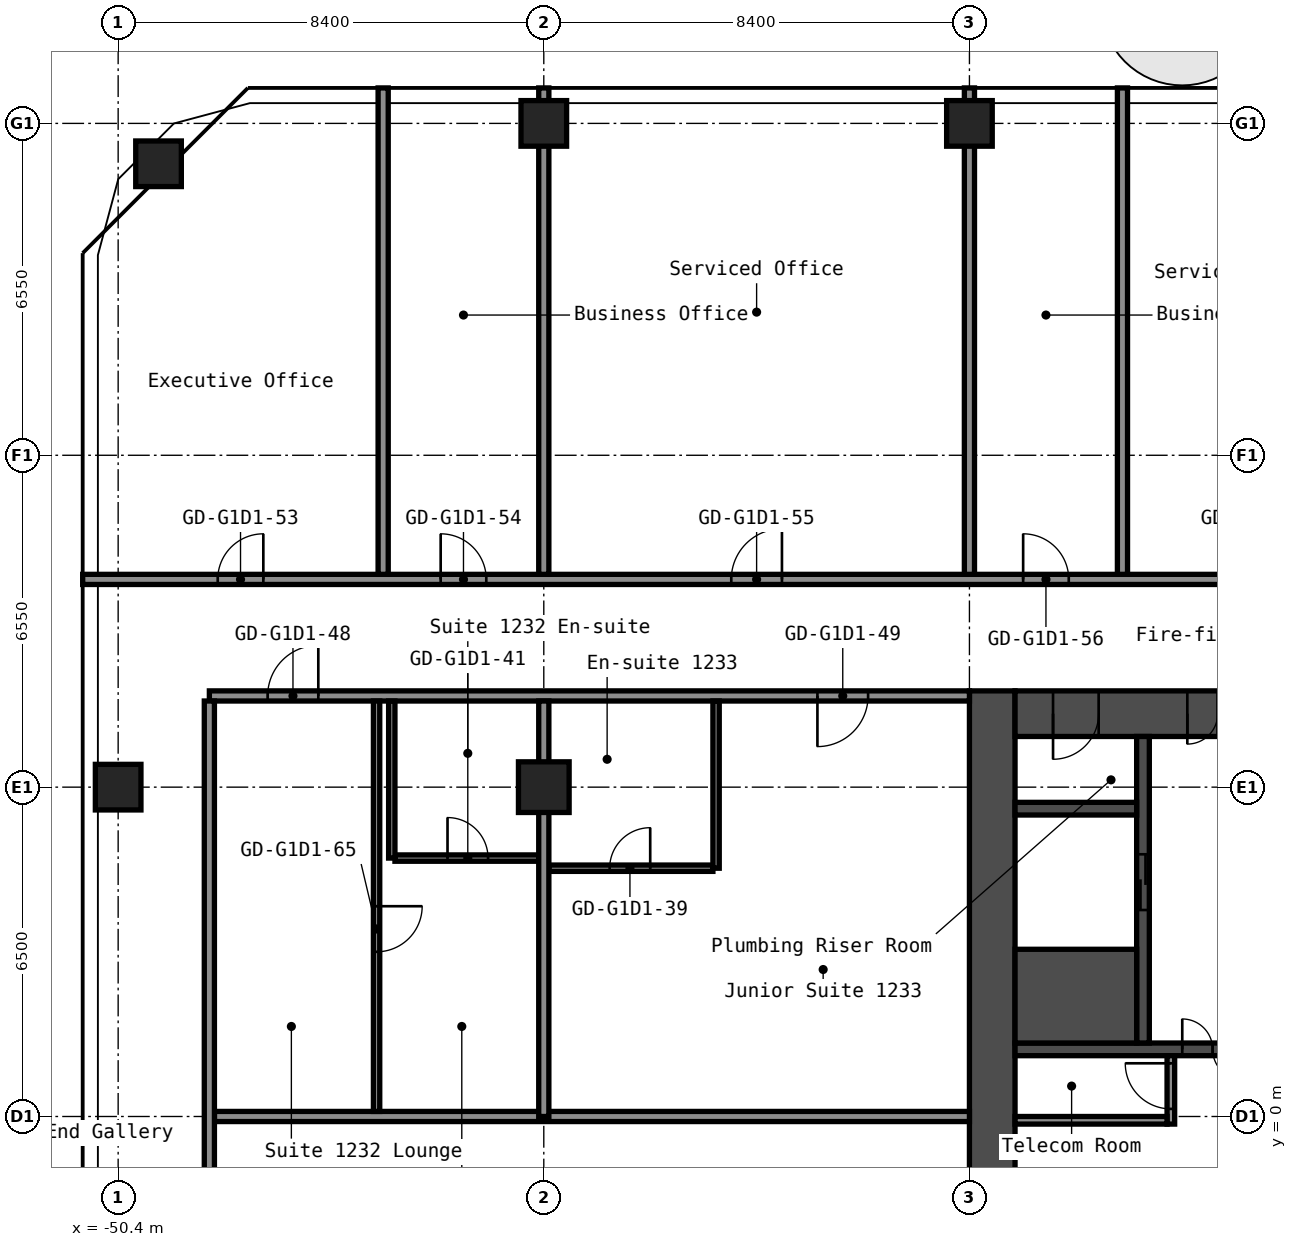
"""IFC4 building model, lengths in metres.
Left out: names, types, materials, properties, quantities, classifications, styles, units other than length and angle.
Written with IfcOpenShell. Run it as: python <this file> out.ifc"""

import sys

from ifc_helpers import new_model, si_unit, direction, frame, frame_2d, origin, origin_2d, place, context, subcontext, project, spatial, rectangle, hollow_rectangle, extrude, element, fill, save


model = new_model("IFC4")
c1 = context("Model", 3, precision=1e-05, world=origin(), true_north=direction((0.0, 1.0)))
c2 = subcontext(c1, "Body", "Model", "MODEL_VIEW")
j1 = project(units=[si_unit("LENGTHUNIT", "METRE"), si_unit("PLANEANGLEUNIT", "RADIAN")], contexts=[c1])
p1 = place(None, origin())
s1 = spatial("IfcSite", under=j1, at=p1, CompositionType="ELEMENT")
p2 = place(p1, origin())
s2 = spatial("IfcBuilding", under=s1, at=p2, CompositionType="ELEMENT")
p3 = place(p2, frame((0.0, 0.0, 45.4)))
s3 = spatial("IfcBuildingStorey", under=s2, at=p3, CompositionType="ELEMENT", Elevation=45.4)
for number, where, z_axis, x_axis in (
    (1, (-50.4, 6.5, 0.0), (0.0, 0.0, 1.0), (1.0, 0.0, 0.0)),
    (2, (-49.603, 18.803, 0.0), (0.0, 0.0, 1.0), (1.0, 0.0, 0.0)),
):
    element("IfcColumn", number, at=place(p3, frame(where, z_axis=z_axis, x_axis=x_axis)), inside=s3, PredefinedType="COLUMN", context=c2, shape_type="SweptSolid", body=[
        extrude(hollow_rectangle(XDim=0.9, YDim=0.9, WallThickness=0.036, at=origin_2d()), origin(), (0.0, 0.0, 1.0), 2.8),
    ])
p4 = place(p3, frame((-42.0, 6.5, 0.0), z_axis=(0.0, 0.0, 1.0), x_axis=(1.0, 0.0, 0.0)))
e3 = element("IfcColumn", 3, at=p4, inside=s3, PredefinedType="COLUMN", context=c2, shape_type="SweptSolid", body=[
    extrude(hollow_rectangle(XDim=1.0, YDim=1.0, WallThickness=0.04, at=origin_2d()), origin(), (0.0, 0.0, 1.0), 2.8),
])
for number, where, z_axis, x_axis in (
    (4, (-42.0, 19.6, 0.0), (0.0, 0.0, 1.0), (1.0, 0.0, 0.0)),
    (5, (-33.6, 19.6, 0.0), (0.0, 0.0, 1.0), (1.0, 0.0, 0.0)),
):
    element("IfcColumn", number, at=place(p3, frame(where, z_axis=z_axis, x_axis=x_axis)), inside=s3, PredefinedType="COLUMN", context=c2, shape_type="SweptSolid", body=[
        extrude(hollow_rectangle(XDim=0.9, YDim=0.9, WallThickness=0.036, at=origin_2d()), origin(), (0.0, 0.0, 1.0), 2.8),
    ])
p5 = place(p3, frame((-33.15, -8.4, 0.0), z_axis=(0.0, 0.0, 1.0), x_axis=(0.0, 1.0, 0.0)))
e6 = element("IfcWall", 6, at=p5, inside=s3, PredefinedType="SHEAR", context=c2, shape_type="SweptSolid", body=[
    extrude(rectangle(XDim=16.8, YDim=0.9, at=frame_2d((8.4, 0.0))), origin(), (0.0, 0.0, 1.0), 2.8),
])
p6 = place(p3, frame((-32.7, 7.95, 0.0), z_axis=(0.0, 0.0, 1.0), x_axis=(1.0, 0.0, 0.0)))
e7 = element("IfcWall", 7, at=p6, inside=s3, PredefinedType="SHEAR", context=c2, shape_type="SweptSolid", body=[
    extrude(rectangle(XDim=15.0, YDim=0.9, at=frame_2d((7.5, 0.0))), origin(), (0.0, 0.0, 1.0), 2.8),
])
p7 = place(p6, frame((3.4, 0.0, 0.0)))
e8 = element("IfcOpeningElement", 8, at=p7, cuts=e7, PredefinedType="OPENING", context=c2, shape_type="SweptSolid", body=[
    extrude(rectangle(XDim=1.2, YDim=2.1, at=frame_2d((0.6, 1.05))), frame((0.0, 0.46, 0.0), z_axis=(0.0, -1.0, 0.0), x_axis=(1.0, 0.0, 0.0)), (0.0, 0.0, 1.0), 0.92),
])
p8 = place(p6, frame((0.75, 0.0, 0.0)))
e9 = element("IfcOpeningElement", 9, at=p8, cuts=e7, PredefinedType="OPENING", context=c2, shape_type="SweptSolid", body=[
    extrude(rectangle(XDim=0.9, YDim=2.1, at=frame_2d((0.45, 1.05))), frame((0.0, 0.46, 0.0), z_axis=(0.0, -1.0, 0.0), x_axis=(1.0, 0.0, 0.0)), (0.0, 0.0, 1.0), 0.92),
])
p9 = place(p3, frame((-32.7, 1.325, 0.0), z_axis=(0.0, 0.0, 1.0), x_axis=(1.0, 0.0, 0.0)))
e10 = element("IfcWall", 10, at=p9, inside=s3, PredefinedType="SHEAR", context=c2, shape_type="SweptSolid", body=[
    extrude(rectangle(XDim=5.05, YDim=0.25, at=frame_2d((2.525, 0.0))), origin(), (0.0, 0.0, 1.0), 2.8),
])
p10 = place(p9, frame((3.3, 0.0, 0.0)))
e11 = element("IfcOpeningElement", 11, at=p10, cuts=e10, PredefinedType="OPENING", context=c2, shape_type="SweptSolid", body=[
    extrude(rectangle(XDim=1.2, YDim=2.1, at=frame_2d((0.6, 1.05))), frame((0.0, 0.135, 0.0), z_axis=(0.0, -1.0, 0.0), x_axis=(1.0, 0.0, 0.0)), (0.0, 0.0, 1.0), 0.27),
])
p11 = place(p3, frame((-30.175, 1.45, 0.0), z_axis=(0.0, 0.0, 1.0), x_axis=(0.0, 1.0, 0.0)))
e12 = element("IfcWall", 12, at=p11, inside=s3, PredefinedType="SHEAR", context=c2, shape_type="SweptSolid", body=[
    extrude(rectangle(XDim=6.05, YDim=0.25, at=frame_2d((3.025, 0.0))), origin(), (0.0, 0.0, 1.0), 2.8),
])
p12 = place(p11, frame((2.625, 0.0, 0.0)))
e13 = element("IfcOpeningElement", 13, at=p12, cuts=e12, PredefinedType="OPENING", context=c2, shape_type="SweptSolid", body=[
    extrude(rectangle(XDim=1.1, YDim=2.1, at=frame_2d((0.55, 1.05))), frame((0.0, 0.135, 0.0), z_axis=(0.0, -1.0, 0.0), x_axis=(1.0, 0.0, 0.0)), (0.0, 0.0, 1.0), 0.27),
])
p13 = place(p3, frame((-32.7, 2.375, 0.0), z_axis=(0.0, 0.0, 1.0), x_axis=(1.0, 0.0, 0.0)))
e14 = element("IfcWall", 14, at=p13, inside=s3, PredefinedType="SHEAR", context=c2, shape_type="SweptSolid", body=[
    extrude(rectangle(XDim=2.4, YDim=1.85, at=frame_2d((1.2, 0.0))), origin(), (0.0, 0.0, 1.0), 2.8),
])
p14 = place(p3, frame((-32.7, 6.075, 0.0), z_axis=(0.0, 0.0, 1.0), x_axis=(1.0, 0.0, 0.0)))
e15 = element("IfcWall", 15, at=p14, inside=s3, PredefinedType="SHEAR", context=c2, shape_type="SweptSolid", body=[
    extrude(rectangle(XDim=2.4, YDim=0.25, at=frame_2d((1.2, 0.0))), origin(), (0.0, 0.0, 1.0), 2.8),
])
p15 = place(p3, frame((-29.625, -0.15, 0.0), z_axis=(0.0, 0.0, 1.0), x_axis=(0.0, 1.0, 0.0)))
e16 = element("IfcWall", 16, at=p15, inside=s3, PredefinedType="PARTITIONING", context=c2, shape_type="SweptSolid", body=[
    extrude(rectangle(XDim=1.35, YDim=0.15, at=frame_2d((0.675, 0.0))), origin(), (0.0, 0.0, 1.0), 2.8),
])
p16 = place(p15, frame((0.3, 0.0, 0.0)))
e17 = element("IfcOpeningElement", 17, at=p16, cuts=e16, PredefinedType="OPENING", context=c2, shape_type="SweptSolid", body=[
    extrude(rectangle(XDim=0.9, YDim=2.1, at=frame_2d((0.45, 1.05))), frame((0.0, 0.085, 0.0), z_axis=(0.0, -1.0, 0.0), x_axis=(1.0, 0.0, 0.0)), (0.0, 0.0, 1.0), 0.17),
])
p17 = place(p3, frame((-32.7, -0.075, 0.0), z_axis=(0.0, 0.0, 1.0), x_axis=(1.0, 0.0, 0.0)))
e18 = element("IfcWall", 18, at=p17, inside=s3, PredefinedType="PARTITIONING", context=c2, shape_type="SweptSolid", body=[
    extrude(rectangle(XDim=3.0, YDim=0.15, at=frame_2d((1.5, 0.0))), origin(), (0.0, 0.0, 1.0), 2.8),
])
p18 = place(p3, frame((-48.5, 0.0, 0.0), z_axis=(0.0, 0.0, 1.0), x_axis=(1.0, 0.0, 0.0)))
e19 = element("IfcWall", 19, at=p18, inside=s3, PredefinedType="PARTITIONING", context=c2, shape_type="SweptSolid", body=[
    extrude(rectangle(XDim=14.9, YDim=0.2, at=frame_2d((7.45, 0.0))), origin(), (0.0, 0.0, 1.0), 2.8),
])
p19 = place(p3, frame((-41.9, 4.9, 0.0), z_axis=(0.0, 0.0, 1.0), x_axis=(1.0, 0.0, 0.0)))
e20 = element("IfcWall", 20, at=p19, inside=s3, PredefinedType="PARTITIONING", context=c2, shape_type="SweptSolid", body=[
    extrude(rectangle(XDim=3.237, YDim=0.125, at=frame_2d((1.619, 0.0))), origin(), (0.0, 0.0, 1.0), 2.8),
])
p20 = place(p19, frame((1.2, 0.0, 0.0)))
e21 = element("IfcOpeningElement", 21, at=p20, cuts=e20, PredefinedType="OPENING", context=c2, shape_type="SweptSolid", body=[
    extrude(rectangle(XDim=0.8, YDim=2.1, at=frame_2d((0.4, 1.05))), frame((0.0, 0.073, 0.0), z_axis=(0.0, -1.0, 0.0), x_axis=(1.0, 0.0, 0.0)), (0.0, 0.0, 1.0), 0.145),
])
p21 = place(p3, frame((-44.938, 5.1, 0.0), z_axis=(0.0, 0.0, 1.0), x_axis=(1.0, 0.0, 0.0)))
e22 = element("IfcWall", 22, at=p21, inside=s3, PredefinedType="PARTITIONING", context=c2, shape_type="SweptSolid", body=[
    extrude(rectangle(XDim=2.837, YDim=0.125, at=frame_2d((1.419, 0.0))), origin(), (0.0, 0.0, 1.0), 2.8),
])
p22 = place(p21, frame((1.038, 0.0, 0.0)))
e23 = element("IfcOpeningElement", 23, at=p22, cuts=e22, PredefinedType="OPENING", context=c2, shape_type="SweptSolid", body=[
    extrude(rectangle(XDim=0.8, YDim=2.1, at=frame_2d((0.4, 1.05))), frame((0.0, 0.073, 0.0), z_axis=(0.0, -1.0, 0.0), x_axis=(1.0, 0.0, 0.0)), (0.0, 0.0, 1.0), 0.145),
])
p23 = place(p3, frame((-48.6, 8.3, 0.0), z_axis=(0.0, 0.0, 1.0), x_axis=(1.0, 0.0, 0.0)))
e24 = element("IfcWall", 24, at=p23, inside=s3, PredefinedType="PARTITIONING", context=c2, shape_type="SweptSolid", body=[
    extrude(rectangle(XDim=15.0, YDim=0.2, at=frame_2d((7.5, 0.0))), origin(), (0.0, 0.0, 1.0), 2.8),
])
p24 = place(p23, frame((1.15, 0.0, 0.0)))
e25 = element("IfcOpeningElement", 25, at=p24, cuts=e24, PredefinedType="OPENING", context=c2, shape_type="SweptSolid", body=[
    extrude(rectangle(XDim=1.0, YDim=2.1, at=frame_2d((0.5, 1.05))), frame((0.0, 0.11, 0.0), z_axis=(0.0, -1.0, 0.0), x_axis=(1.0, 0.0, 0.0)), (0.0, 0.0, 1.0), 0.22),
])
p25 = place(p23, frame((12.0, 0.0, 0.0)))
e26 = element("IfcOpeningElement", 26, at=p25, cuts=e24, PredefinedType="OPENING", context=c2, shape_type="SweptSolid", body=[
    extrude(rectangle(XDim=1.0, YDim=2.1, at=frame_2d((0.5, 1.05))), frame((0.0, 0.11, 0.0), z_axis=(0.0, -1.0, 0.0), x_axis=(1.0, 0.0, 0.0)), (0.0, 0.0, 1.0), 0.22),
])
p26 = place(p3, frame((-51.1, 10.6, 0.0), z_axis=(0.0, 0.0, 1.0), x_axis=(1.0, 0.0, 0.0)))
e27 = element("IfcWall", 27, at=p26, inside=s3, PredefinedType="PARTITIONING", context=c2, shape_type="SweptSolid", body=[
    extrude(rectangle(XDim=34.3, YDim=0.2, at=frame_2d((17.15, 0.0))), origin(), (0.0, 0.0, 1.0), 2.8),
])
p27 = place(p26, frame((2.665, 0.0, 0.0)))
e28 = element("IfcOpeningElement", 28, at=p27, cuts=e27, PredefinedType="OPENING", context=c2, shape_type="SweptSolid", body=[
    extrude(rectangle(XDim=0.9, YDim=2.1, at=frame_2d((0.45, 1.05))), frame((0.0, 0.11, 0.0), z_axis=(0.0, -1.0, 0.0), x_axis=(1.0, 0.0, 0.0)), (0.0, 0.0, 1.0), 0.22),
])
p28 = place(p26, frame((7.065, 0.0, 0.0)))
e29 = element("IfcOpeningElement", 29, at=p28, cuts=e27, PredefinedType="OPENING", context=c2, shape_type="SweptSolid", body=[
    extrude(rectangle(XDim=0.9, YDim=2.1, at=frame_2d((0.45, 1.05))), frame((0.0, 0.11, 0.0), z_axis=(0.0, -1.0, 0.0), x_axis=(1.0, 0.0, 0.0)), (0.0, 0.0, 1.0), 0.22),
])
p29 = place(p26, frame((12.8, 0.0, 0.0)))
e30 = element("IfcOpeningElement", 30, at=p29, cuts=e27, PredefinedType="OPENING", context=c2, shape_type="SweptSolid", body=[
    extrude(rectangle(XDim=1.0, YDim=2.1, at=frame_2d((0.5, 1.05))), frame((0.0, 0.11, 0.0), z_axis=(0.0, -1.0, 0.0), x_axis=(1.0, 0.0, 0.0)), (0.0, 0.0, 1.0), 0.22),
])
p30 = place(p26, frame((18.56, 0.0, 0.0)))
e31 = element("IfcOpeningElement", 31, at=p30, cuts=e27, PredefinedType="OPENING", context=c2, shape_type="SweptSolid", body=[
    extrude(rectangle(XDim=0.9, YDim=2.1, at=frame_2d((0.45, 1.05))), frame((0.0, 0.11, 0.0), z_axis=(0.0, -1.0, 0.0), x_axis=(1.0, 0.0, 0.0)), (0.0, 0.0, 1.0), 0.22),
])
p31 = place(p26, frame((22.76, 0.0, 0.0)))
e32 = element("IfcOpeningElement", 32, at=p31, cuts=e27, PredefinedType="OPENING", context=c2, shape_type="SweptSolid", body=[
    extrude(rectangle(XDim=0.9, YDim=2.1, at=frame_2d((0.45, 1.05))), frame((0.0, 0.11, 0.0), z_axis=(0.0, -1.0, 0.0), x_axis=(1.0, 0.0, 0.0)), (0.0, 0.0, 1.0), 0.22),
])
p32 = place(p26, frame((27.045, 0.0, 0.0)))
e33 = element("IfcOpeningElement", 33, at=p32, cuts=e27, PredefinedType="OPENING", context=c2, shape_type="SweptSolid", body=[
    extrude(rectangle(XDim=0.9, YDim=2.1, at=frame_2d((0.45, 1.05))), frame((0.0, 0.11, 0.0), z_axis=(0.0, -1.0, 0.0), x_axis=(1.0, 0.0, 0.0)), (0.0, 0.0, 1.0), 0.22),
])
p33 = place(p26, frame((31.245, 0.0, 0.0)))
e34 = element("IfcOpeningElement", 34, at=p33, cuts=e27, PredefinedType="OPENING", context=c2, shape_type="SweptSolid", body=[
    extrude(rectangle(XDim=0.9, YDim=2.1, at=frame_2d((0.45, 1.05))), frame((0.0, 0.11, 0.0), z_axis=(0.0, -1.0, 0.0), x_axis=(1.0, 0.0, 0.0)), (0.0, 0.0, 1.0), 0.22),
])
p34 = place(p3, frame((-48.6, -8.2, 0.0), z_axis=(0.0, 0.0, 1.0), x_axis=(0.0, 1.0, 0.0)))
e35 = element("IfcWall", 35, at=p34, inside=s3, PredefinedType="PARTITIONING", context=c2, shape_type="SweptSolid", body=[
    extrude(rectangle(XDim=16.4, YDim=0.2, at=frame_2d((8.2, 0.0))), origin(), (0.0, 0.0, 1.0), 2.8),
])
p35 = place(p3, frame((-45.3, 0.1, 0.0), z_axis=(0.0, 0.0, 1.0), x_axis=(0.0, 1.0, 0.0)))
e36 = element("IfcWall", 36, at=p35, inside=s3, PredefinedType="PARTITIONING", context=c2, shape_type="SweptSolid", body=[
    extrude(rectangle(XDim=8.1, YDim=0.125, at=frame_2d((4.05, 0.0))), origin(), (0.0, 0.0, 1.0), 2.8),
])
p36 = place(p35, frame((3.15, 0.0, 0.0)))
e37 = element("IfcOpeningElement", 37, at=p36, cuts=e36, PredefinedType="OPENING", context=c2, shape_type="SweptSolid", body=[
    extrude(rectangle(XDim=0.9, YDim=2.1, at=frame_2d((0.45, 1.05))), frame((0.0, 0.073, 0.0), z_axis=(0.0, -1.0, 0.0), x_axis=(1.0, 0.0, 0.0)), (0.0, 0.0, 1.0), 0.145),
])
p37 = place(p3, frame((-45.17, 10.7, 0.0), z_axis=(0.0, 0.0, 1.0), x_axis=(0.0, 1.0, 0.0)))
e38 = element("IfcWall", 38, at=p37, inside=s3, PredefinedType="PARTITIONING", context=c2, shape_type="SweptSolid", body=[
    extrude(rectangle(XDim=9.6, YDim=0.2, at=frame_2d((4.8, 0.0))), origin(), (0.0, 0.0, 1.0), 2.8),
])
p38 = place(p3, frame((-45.0, 5.1, 0.0), z_axis=(0.0, 0.0, 1.0), x_axis=(0.0, 1.0, 0.0)))
e39 = element("IfcWall", 39, at=p38, inside=s3, PredefinedType="PARTITIONING", context=c2, shape_type="SweptSolid", body=[
    extrude(rectangle(XDim=3.1, YDim=0.125, at=frame_2d((1.55, 0.0))), origin(), (0.0, 0.0, 1.0), 2.8),
])
p39 = place(p3, frame((-42.0, 0.0, 0.0), z_axis=(0.0, 0.0, 1.0), x_axis=(0.0, 1.0, 0.0)))
e40 = element("IfcWall", 40, at=p39, inside=s3, PredefinedType="PARTITIONING", context=c2, shape_type="SweptSolid", body=[
    extrude(rectangle(XDim=8.2, YDim=0.2, at=frame_2d((4.1, 0.0))), origin(), (0.0, 0.0, 1.0), 2.8),
])
p40 = place(p3, frame((-42.0, 10.7, 0.0), z_axis=(0.0, 0.0, 1.0), x_axis=(0.0, 1.0, 0.0)))
e41 = element("IfcWall", 41, at=p40, inside=s3, PredefinedType="PARTITIONING", context=c2, shape_type="SweptSolid", body=[
    extrude(rectangle(XDim=9.6, YDim=0.2, at=frame_2d((4.8, 0.0))), origin(), (0.0, 0.0, 1.0), 2.8),
])
p41 = place(p3, frame((-38.6, 4.9, 0.0), z_axis=(0.0, 0.0, 1.0), x_axis=(0.0, 1.0, 0.0)))
e42 = element("IfcWall", 42, at=p41, inside=s3, PredefinedType="PARTITIONING", context=c2, shape_type="SweptSolid", body=[
    extrude(rectangle(XDim=3.3, YDim=0.125, at=frame_2d((1.65, 0.0))), origin(), (0.0, 0.0, 1.0), 2.8),
])
for number, where, z_axis, x_axis in (
    (43, (-33.6, 10.7, 0.0), (0.0, 0.0, 1.0), (0.0, 1.0, 0.0)),
    (44, (-30.58, 10.7, 0.0), (0.0, 0.0, 1.0), (0.0, 1.0, 0.0)),
):
    element("IfcWall", number, at=place(p3, frame(where, z_axis=z_axis, x_axis=x_axis)), inside=s3, PredefinedType="PARTITIONING", context=c2, shape_type="SweptSolid", body=[
        extrude(rectangle(XDim=9.6, YDim=0.2, at=frame_2d((4.8, 0.0))), origin(), (0.0, 0.0, 1.0), 2.8),
    ])
p42 = place(p7, origin())
e45 = element("IfcDoor", 45, at=p42, inside=s3, OperationType="DOUBLE_DOOR_SINGLE_SWING", PredefinedType="DOOR", context=c2, shape_type="SweptSolid", body=[
    extrude(rectangle(XDim=1.2, YDim=2.1, at=frame_2d((0.6, 1.05))), frame((0.0, 0.025, 0.0), z_axis=(0.0, -1.0, 0.0), x_axis=(1.0, 0.0, 0.0)), (0.0, 0.0, 1.0), 0.05),
])
fill(e8, e45)
p43 = place(p8, origin())
e46 = element("IfcDoor", 46, at=p43, inside=s3, OperationType="SINGLE_SWING_LEFT", PredefinedType="DOOR", context=c2, shape_type="SweptSolid", body=[
    extrude(rectangle(XDim=0.9, YDim=2.1, at=frame_2d((0.45, 1.05))), frame((0.0, 0.025, 0.0), z_axis=(0.0, -1.0, 0.0), x_axis=(1.0, 0.0, 0.0)), (0.0, 0.0, 1.0), 0.05),
])
fill(e9, e46)
p44 = place(p10, origin())
e47 = element("IfcDoor", 47, at=p44, inside=s3, OperationType="DOUBLE_DOOR_SINGLE_SWING", PredefinedType="DOOR", context=c2, shape_type="SweptSolid", body=[
    extrude(rectangle(XDim=1.2, YDim=2.1, at=frame_2d((0.6, 1.05))), frame((0.0, 0.025, 0.0), z_axis=(0.0, -1.0, 0.0), x_axis=(1.0, 0.0, 0.0)), (0.0, 0.0, 1.0), 0.05),
])
fill(e11, e47)
p45 = place(p16, origin())
e48 = element("IfcDoor", 48, at=p45, inside=s3, OperationType="SINGLE_SWING_LEFT", PredefinedType="DOOR", context=c2, shape_type="SweptSolid", body=[
    extrude(rectangle(XDim=0.9, YDim=2.1, at=frame_2d((0.45, 1.05))), frame((0.0, 0.025, 0.0), z_axis=(0.0, -1.0, 0.0), x_axis=(1.0, 0.0, 0.0)), (0.0, 0.0, 1.0), 0.05),
])
fill(e17, e48)
p46 = place(p12, origin())
e49 = element("IfcDoor", 49, at=p46, inside=s3, OperationType="DOUBLE_DOOR_SLIDING", PredefinedType="DOOR", context=c2, shape_type="SweptSolid", body=[
    extrude(rectangle(XDim=1.1, YDim=2.1, at=frame_2d((0.55, 1.05))), frame((0.0, 0.025, 0.0), z_axis=(0.0, -1.0, 0.0), x_axis=(1.0, 0.0, 0.0)), (0.0, 0.0, 1.0), 0.05),
])
fill(e13, e49)
p47 = place(p20, origin())
e50 = element("IfcDoor", 50, at=p47, inside=s3, OperationType="SINGLE_SWING_LEFT", PredefinedType="DOOR", context=c2, shape_type="SweptSolid", body=[
    extrude(rectangle(XDim=0.8, YDim=2.1, at=frame_2d((0.4, 1.05))), frame((0.0, 0.025, 0.0), z_axis=(0.0, -1.0, 0.0), x_axis=(1.0, 0.0, 0.0)), (0.0, 0.0, 1.0), 0.05),
])
fill(e21, e50)
p48 = place(p22, origin())
e51 = element("IfcDoor", 51, at=p48, inside=s3, OperationType="SINGLE_SWING_RIGHT", PredefinedType="DOOR", context=c2, shape_type="SweptSolid", body=[
    extrude(rectangle(XDim=0.8, YDim=2.1, at=frame_2d((0.4, 1.05))), frame((0.0, 0.025, 0.0), z_axis=(0.0, -1.0, 0.0), x_axis=(1.0, 0.0, 0.0)), (0.0, 0.0, 1.0), 0.05),
])
fill(e23, e51)
p49 = place(p24, origin())
e52 = element("IfcDoor", 52, at=p49, inside=s3, OperationType="SINGLE_SWING_LEFT", PredefinedType="DOOR", context=c2, shape_type="SweptSolid", body=[
    extrude(rectangle(XDim=1.0, YDim=2.1, at=frame_2d((0.5, 1.05))), frame((0.0, 0.025, 0.0), z_axis=(0.0, -1.0, 0.0), x_axis=(1.0, 0.0, 0.0)), (0.0, 0.0, 1.0), 0.05),
])
fill(e25, e52)
p50 = place(p25, origin())
e53 = element("IfcDoor", 53, at=p50, inside=s3, OperationType="SINGLE_SWING_LEFT", PredefinedType="DOOR", context=c2, shape_type="SweptSolid", body=[
    extrude(rectangle(XDim=1.0, YDim=2.1, at=frame_2d((0.5, 1.05))), frame((0.0, 0.025, 0.0), z_axis=(0.0, -1.0, 0.0), x_axis=(1.0, 0.0, 0.0)), (0.0, 0.0, 1.0), 0.05),
])
fill(e26, e53)
p51 = place(p27, origin())
e54 = element("IfcDoor", 54, at=p51, inside=s3, OperationType="SINGLE_SWING_LEFT", PredefinedType="DOOR", context=c2, shape_type="SweptSolid", body=[
    extrude(rectangle(XDim=0.9, YDim=2.1, at=frame_2d((0.45, 1.05))), frame((0.0, 0.025, 0.0), z_axis=(0.0, -1.0, 0.0), x_axis=(1.0, 0.0, 0.0)), (0.0, 0.0, 1.0), 0.05),
])
fill(e28, e54)
p52 = place(p28, origin())
e55 = element("IfcDoor", 55, at=p52, inside=s3, OperationType="SINGLE_SWING_RIGHT", PredefinedType="DOOR", context=c2, shape_type="SweptSolid", body=[
    extrude(rectangle(XDim=0.9, YDim=2.1, at=frame_2d((0.45, 1.05))), frame((0.0, 0.025, 0.0), z_axis=(0.0, -1.0, 0.0), x_axis=(1.0, 0.0, 0.0)), (0.0, 0.0, 1.0), 0.05),
])
fill(e29, e55)
p53 = place(p29, origin())
e56 = element("IfcDoor", 56, at=p53, inside=s3, OperationType="SINGLE_SWING_LEFT", PredefinedType="DOOR", context=c2, shape_type="SweptSolid", body=[
    extrude(rectangle(XDim=1.0, YDim=2.1, at=frame_2d((0.5, 1.05))), frame((0.0, 0.025, 0.0), z_axis=(0.0, -1.0, 0.0), x_axis=(1.0, 0.0, 0.0)), (0.0, 0.0, 1.0), 0.05),
])
fill(e30, e56)
p54 = place(p30, origin())
e57 = element("IfcDoor", 57, at=p54, inside=s3, OperationType="SINGLE_SWING_RIGHT", PredefinedType="DOOR", context=c2, shape_type="SweptSolid", body=[
    extrude(rectangle(XDim=0.9, YDim=2.1, at=frame_2d((0.45, 1.05))), frame((0.0, 0.025, 0.0), z_axis=(0.0, -1.0, 0.0), x_axis=(1.0, 0.0, 0.0)), (0.0, 0.0, 1.0), 0.05),
])
fill(e31, e57)
p55 = place(p36, origin())
e58 = element("IfcDoor", 58, at=p55, inside=s3, OperationType="SINGLE_SWING_RIGHT", PredefinedType="DOOR", context=c2, shape_type="SweptSolid", body=[
    extrude(rectangle(XDim=0.9, YDim=2.1, at=frame_2d((0.45, 1.05))), frame((0.0, 0.025, 0.0), z_axis=(0.0, -1.0, 0.0), x_axis=(1.0, 0.0, 0.0)), (0.0, 0.0, 1.0), 0.05),
])
fill(e37, e58)
save(model, sys.argv[1])
